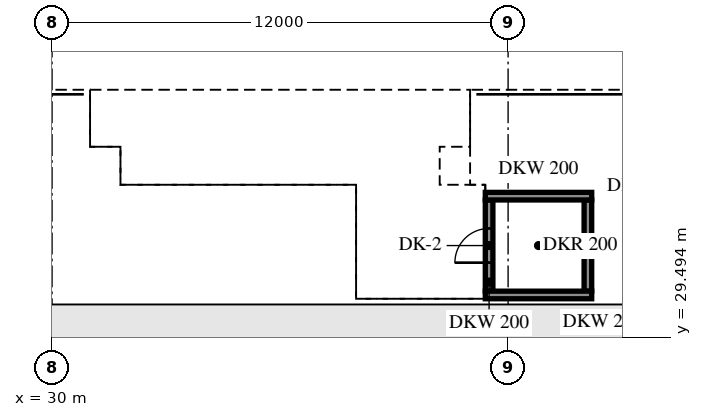
"""IFC4 building model, lengths in metres.
Left out: names, types, materials, properties, quantities, classifications, styles, units other than length and angle.
Written with IfcOpenShell. Run it as: python <this file> out.ifc"""

import sys

from ifc_helpers import new_model, si_unit, direction, frame, frame_2d, origin, place, context, subcontext, project, spatial, polyline, rectangle, outline, extrude, element, fill, save


model = new_model("IFC4")
c1 = context("Model", 3, precision=1e-05, world=origin(), true_north=direction((0.0, 1.0)))
c2 = subcontext(c1, "Body", "Model", "MODEL_VIEW")
j1 = project(units=[si_unit("LENGTHUNIT", "METRE"), si_unit("PLANEANGLEUNIT", "RADIAN")], contexts=[c1])
p1 = place(None, origin())
s1 = spatial("IfcSite", under=j1, at=p1, CompositionType="ELEMENT")
p2 = place(p1, origin())
s2 = spatial("IfcBuilding", under=s1, at=p2, CompositionType="ELEMENT")
p3 = place(p2, frame((0.0, 0.0, 7.2)))
s3 = spatial("IfcBuildingStorey", under=s2, at=p3, CompositionType="ELEMENT", Elevation=7.2)
p4 = place(p3, origin())
e1 = element("IfcWall", 1, at=p4, inside=s3, PredefinedType="NOTDEFINED", context=c2, shape_type="SweptSolid", body=[
    extrude(outline(polyline([(28.0, 33.5), (31.0, 33.5), (31.0, 34.0), (28.0, 34.0), (28.0, 33.5)])), origin(), (0.0, 0.0, 1.0), 11.34),
])
p5 = place(p3, origin())
e2 = element("IfcWall", 2, at=p5, inside=s3, PredefinedType="NOTDEFINED", context=c2, shape_type="SweptSolid", body=[
    extrude(outline(polyline([(41.0, 33.5), (44.0, 33.5), (44.0, 34.0), (41.0, 34.0), (41.0, 33.5)])), origin(), (0.0, 0.0, 1.0), 11.34),
])
p6 = place(p3, frame((0.0, 0.0, 11.34)))
e3 = element("IfcWall", 3, at=p6, inside=s3, PredefinedType="NOTDEFINED", context=c2, shape_type="SweptSolid", body=[
    extrude(outline(polyline([(28.0, 33.5), (31.018, 33.5), (31.018, 34.0), (28.0, 34.0), (28.0, 33.5)])), origin(), (0.0, 0.0, 1.0), 0.6),
])
p7 = place(p3, frame((0.0, 0.0, 11.34)))
e4 = element("IfcWall", 4, at=p7, inside=s3, PredefinedType="NOTDEFINED", context=c2, shape_type="SweptSolid", body=[
    extrude(outline(polyline([(40.982, 33.5), (44.0, 33.5), (44.0, 34.0), (40.982, 34.0), (40.982, 33.5)])), origin(), (0.0, 0.0, 1.0), 0.6),
])
p8 = place(p3, frame((0.0, 0.0, 11.94)))
e5 = element("IfcWall", 5, at=p8, inside=s3, PredefinedType="NOTDEFINED", context=c2, shape_type="SweptSolid", body=[
    extrude(outline(polyline([(28.0, 33.5), (31.072, 33.5), (31.072, 34.0), (28.0, 34.0), (28.0, 33.5)])), origin(), (0.0, 0.0, 1.0), 0.6),
])
p9 = place(p3, frame((0.0, 0.0, 11.94)))
e6 = element("IfcWall", 6, at=p9, inside=s3, PredefinedType="NOTDEFINED", context=c2, shape_type="SweptSolid", body=[
    extrude(outline(polyline([(40.928, 33.5), (44.0, 33.5), (44.0, 34.0), (40.928, 34.0), (40.928, 33.5)])), origin(), (0.0, 0.0, 1.0), 0.6),
])
p10 = place(p3, frame((0.0, 0.0, 12.54)))
e7 = element("IfcWall", 7, at=p10, inside=s3, PredefinedType="NOTDEFINED", context=c2, shape_type="SweptSolid", body=[
    extrude(outline(polyline([(28.0, 33.5), (31.163, 33.5), (31.163, 34.0), (28.0, 34.0), (28.0, 33.5)])), origin(), (0.0, 0.0, 1.0), 0.6),
])
p11 = place(p3, frame((0.0, 0.0, 12.54)))
e8 = element("IfcWall", 8, at=p11, inside=s3, PredefinedType="NOTDEFINED", context=c2, shape_type="SweptSolid", body=[
    extrude(outline(polyline([(40.837, 33.5), (44.0, 33.5), (44.0, 34.0), (40.837, 34.0), (40.837, 33.5)])), origin(), (0.0, 0.0, 1.0), 0.6),
])
p12 = place(p3, frame((0.0, 0.0, 13.14)))
e9 = element("IfcWall", 9, at=p12, inside=s3, PredefinedType="NOTDEFINED", context=c2, shape_type="SweptSolid", body=[
    extrude(outline(polyline([(28.0, 33.5), (31.292, 33.5), (31.292, 34.0), (28.0, 34.0), (28.0, 33.5)])), origin(), (0.0, 0.0, 1.0), 0.6),
])
p13 = place(p3, frame((0.0, 0.0, 13.14)))
e10 = element("IfcWall", 10, at=p13, inside=s3, PredefinedType="NOTDEFINED", context=c2, shape_type="SweptSolid", body=[
    extrude(outline(polyline([(40.708, 33.5), (44.0, 33.5), (44.0, 34.0), (40.708, 34.0), (40.708, 33.5)])), origin(), (0.0, 0.0, 1.0), 0.6),
])
p14 = place(p3, frame((0.0, 0.0, 13.74)))
e11 = element("IfcWall", 11, at=p14, inside=s3, PredefinedType="NOTDEFINED", context=c2, shape_type="SweptSolid", body=[
    extrude(outline(polyline([(28.0, 33.5), (31.461, 33.5), (31.461, 34.0), (28.0, 34.0), (28.0, 33.5)])), origin(), (0.0, 0.0, 1.0), 0.6),
])
p15 = place(p3, frame((0.0, 0.0, 13.74)))
e12 = element("IfcWall", 12, at=p15, inside=s3, PredefinedType="NOTDEFINED", context=c2, shape_type="SweptSolid", body=[
    extrude(outline(polyline([(40.539, 33.5), (44.0, 33.5), (44.0, 34.0), (40.539, 34.0), (40.539, 33.5)])), origin(), (0.0, 0.0, 1.0), 0.6),
])
p16 = place(p3, frame((0.0, 0.0, 14.34)))
e13 = element("IfcWall", 13, at=p16, inside=s3, PredefinedType="NOTDEFINED", context=c2, shape_type="SweptSolid", body=[
    extrude(outline(polyline([(28.0, 33.5), (31.67, 33.5), (31.67, 34.0), (28.0, 34.0), (28.0, 33.5)])), origin(), (0.0, 0.0, 1.0), 0.6),
])
p17 = place(p3, frame((0.0, 0.0, 14.34)))
e14 = element("IfcWall", 14, at=p17, inside=s3, PredefinedType="NOTDEFINED", context=c2, shape_type="SweptSolid", body=[
    extrude(outline(polyline([(40.33, 33.5), (44.0, 33.5), (44.0, 34.0), (40.33, 34.0), (40.33, 33.5)])), origin(), (0.0, 0.0, 1.0), 0.6),
])
p18 = place(p3, frame((0.0, 0.0, 14.94)))
e15 = element("IfcWall", 15, at=p18, inside=s3, PredefinedType="NOTDEFINED", context=c2, shape_type="SweptSolid", body=[
    extrude(outline(polyline([(28.0, 33.5), (31.925, 33.5), (31.925, 34.0), (28.0, 34.0), (28.0, 33.5)])), origin(), (0.0, 0.0, 1.0), 0.6),
])
p19 = place(p3, frame((0.0, 0.0, 14.94)))
e16 = element("IfcWall", 16, at=p19, inside=s3, PredefinedType="NOTDEFINED", context=c2, shape_type="SweptSolid", body=[
    extrude(outline(polyline([(40.075, 33.5), (44.0, 33.5), (44.0, 34.0), (40.075, 34.0), (40.075, 33.5)])), origin(), (0.0, 0.0, 1.0), 0.6),
])
p20 = place(p3, frame((0.0, 0.0, 15.54)))
e17 = element("IfcWall", 17, at=p20, inside=s3, PredefinedType="NOTDEFINED", context=c2, shape_type="SweptSolid", body=[
    extrude(outline(polyline([(28.0, 33.5), (32.227, 33.5), (32.227, 34.0), (28.0, 34.0), (28.0, 33.5)])), origin(), (0.0, 0.0, 1.0), 0.6),
])
p21 = place(p3, frame((0.0, 0.0, 15.54)))
e18 = element("IfcWall", 18, at=p21, inside=s3, PredefinedType="NOTDEFINED", context=c2, shape_type="SweptSolid", body=[
    extrude(outline(polyline([(39.773, 33.5), (44.0, 33.5), (44.0, 34.0), (39.773, 34.0), (39.773, 33.5)])), origin(), (0.0, 0.0, 1.0), 0.6),
])
p22 = place(p3, frame((0.0, 0.0, 16.14)))
e19 = element("IfcWall", 19, at=p22, inside=s3, PredefinedType="NOTDEFINED", context=c2, shape_type="SweptSolid", body=[
    extrude(outline(polyline([(28.0, 33.5), (32.583, 33.5), (32.583, 34.0), (28.0, 34.0), (28.0, 33.5)])), origin(), (0.0, 0.0, 1.0), 0.6),
])
p23 = place(p3, frame((0.0, 0.0, 16.14)))
e20 = element("IfcWall", 20, at=p23, inside=s3, PredefinedType="NOTDEFINED", context=c2, shape_type="SweptSolid", body=[
    extrude(outline(polyline([(39.417, 33.5), (44.0, 33.5), (44.0, 34.0), (39.417, 34.0), (39.417, 33.5)])), origin(), (0.0, 0.0, 1.0), 0.6),
])
p24 = place(p3, frame((0.0, 0.0, 16.74)))
e21 = element("IfcWall", 21, at=p24, inside=s3, PredefinedType="NOTDEFINED", context=c2, shape_type="SweptSolid", body=[
    extrude(outline(polyline([(28.0, 33.5), (33.0, 33.5), (33.0, 34.0), (28.0, 34.0), (28.0, 33.5)])), origin(), (0.0, 0.0, 1.0), 0.6),
])
p25 = place(p3, frame((0.0, 0.0, 16.74)))
e22 = element("IfcWall", 22, at=p25, inside=s3, PredefinedType="NOTDEFINED", context=c2, shape_type="SweptSolid", body=[
    extrude(outline(polyline([(39.0, 33.5), (44.0, 33.5), (44.0, 34.0), (39.0, 34.0), (39.0, 33.5)])), origin(), (0.0, 0.0, 1.0), 0.6),
])
p26 = place(p3, frame((0.0, 0.0, 17.34)))
e23 = element("IfcWall", 23, at=p26, inside=s3, PredefinedType="NOTDEFINED", context=c2, shape_type="SweptSolid", body=[
    extrude(outline(polyline([(28.0, 33.5), (33.487, 33.5), (33.487, 34.0), (28.0, 34.0), (28.0, 33.5)])), origin(), (0.0, 0.0, 1.0), 0.6),
])
p27 = place(p3, frame((0.0, 0.0, 17.34)))
e24 = element("IfcWall", 24, at=p27, inside=s3, PredefinedType="NOTDEFINED", context=c2, shape_type="SweptSolid", body=[
    extrude(outline(polyline([(38.513, 33.5), (44.0, 33.5), (44.0, 34.0), (38.513, 34.0), (38.513, 33.5)])), origin(), (0.0, 0.0, 1.0), 0.6),
])
p28 = place(p3, frame((0.0, 0.0, 17.94)))
e25 = element("IfcWall", 25, at=p28, inside=s3, PredefinedType="NOTDEFINED", context=c2, shape_type="SweptSolid", body=[
    extrude(outline(polyline([(28.0, 33.5), (34.06, 33.5), (34.06, 34.0), (28.0, 34.0), (28.0, 33.5)])), origin(), (0.0, 0.0, 1.0), 0.6),
])
p29 = place(p3, frame((0.0, 0.0, 17.94)))
e26 = element("IfcWall", 26, at=p29, inside=s3, PredefinedType="NOTDEFINED", context=c2, shape_type="SweptSolid", body=[
    extrude(outline(polyline([(37.94, 33.5), (44.0, 33.5), (44.0, 34.0), (37.94, 34.0), (37.94, 33.5)])), origin(), (0.0, 0.0, 1.0), 0.6),
])
p30 = place(p3, frame((0.0, 0.0, 18.54)))
e27 = element("IfcWall", 27, at=p30, inside=s3, PredefinedType="NOTDEFINED", context=c2, shape_type="SweptSolid", body=[
    extrude(outline(polyline([(28.0, 33.5), (34.742, 33.5), (34.742, 34.0), (28.0, 34.0), (28.0, 33.5)])), origin(), (0.0, 0.0, 1.0), 0.6),
])
p31 = place(p3, frame((0.0, 0.0, 18.54)))
e28 = element("IfcWall", 28, at=p31, inside=s3, PredefinedType="NOTDEFINED", context=c2, shape_type="SweptSolid", body=[
    extrude(outline(polyline([(37.258, 33.5), (44.0, 33.5), (44.0, 34.0), (37.258, 34.0), (37.258, 33.5)])), origin(), (0.0, 0.0, 1.0), 0.6),
])
p32 = place(p3, frame((0.0, 0.0, 19.14)))
e29 = element("IfcWall", 29, at=p32, inside=s3, PredefinedType="NOTDEFINED", context=c2, shape_type="SweptSolid", body=[
    extrude(outline(polyline([(28.0, 33.5), (35.574, 33.5), (35.574, 34.0), (28.0, 34.0), (28.0, 33.5)])), origin(), (0.0, 0.0, 1.0), 0.6),
])
p33 = place(p3, frame((0.0, 0.0, 19.14)))
e30 = element("IfcWall", 30, at=p33, inside=s3, PredefinedType="NOTDEFINED", context=c2, shape_type="SweptSolid", body=[
    extrude(outline(polyline([(36.426, 33.5), (44.0, 33.5), (44.0, 34.0), (36.426, 34.0), (36.426, 33.5)])), origin(), (0.0, 0.0, 1.0), 0.6),
])
p34 = place(p3, frame((0.0, 0.0, 19.74)))
e31 = element("IfcWall", 31, at=p34, inside=s3, PredefinedType="NOTDEFINED", context=c2, shape_type="SweptSolid", body=[
    extrude(outline(polyline([(28.0, 33.5), (44.0, 33.5), (44.0, 34.0), (28.0, 34.0), (28.0, 33.5)])), origin(), (0.0, 0.0, 1.0), 0.26),
])
p35 = place(p3, origin())
e32 = element("IfcWall", 32, at=p35, inside=s3, PredefinedType="NOTDEFINED", context=c2, shape_type="SweptSolid", body=[
    extrude(outline(polyline([(28.0, 34.0), (31.8, 34.0), (31.8, 34.5), (28.0, 34.5), (28.0, 34.0)])), origin(), (0.0, 0.0, 1.0), 12.725),
])
p36 = place(p3, origin())
e33 = element("IfcWall", 33, at=p36, inside=s3, PredefinedType="NOTDEFINED", context=c2, shape_type="SweptSolid", body=[
    extrude(outline(polyline([(40.2, 34.0), (44.0, 34.0), (44.0, 34.5), (40.2, 34.5), (40.2, 34.0)])), origin(), (0.0, 0.0, 1.0), 12.725),
])
p37 = place(p3, frame((0.0, 0.0, 12.725)))
e34 = element("IfcWall", 34, at=p37, inside=s3, PredefinedType="NOTDEFINED", context=c2, shape_type="SweptSolid", body=[
    extrude(outline(polyline([(28.0, 34.0), (31.821, 34.0), (31.821, 34.5), (28.0, 34.5), (28.0, 34.0)])), origin(), (0.0, 0.0, 1.0), 0.6),
])
p38 = place(p3, frame((0.0, 0.0, 12.725)))
e35 = element("IfcWall", 35, at=p38, inside=s3, PredefinedType="NOTDEFINED", context=c2, shape_type="SweptSolid", body=[
    extrude(outline(polyline([(40.179, 34.0), (44.0, 34.0), (44.0, 34.5), (40.179, 34.5), (40.179, 34.0)])), origin(), (0.0, 0.0, 1.0), 0.6),
])
p39 = place(p3, frame((0.0, 0.0, 13.325)))
e36 = element("IfcWall", 36, at=p39, inside=s3, PredefinedType="NOTDEFINED", context=c2, shape_type="SweptSolid", body=[
    extrude(outline(polyline([(28.0, 34.0), (31.886, 34.0), (31.886, 34.5), (28.0, 34.5), (28.0, 34.0)])), origin(), (0.0, 0.0, 1.0), 0.6),
])
p40 = place(p3, frame((0.0, 0.0, 13.325)))
e37 = element("IfcWall", 37, at=p40, inside=s3, PredefinedType="NOTDEFINED", context=c2, shape_type="SweptSolid", body=[
    extrude(outline(polyline([(40.114, 34.0), (44.0, 34.0), (44.0, 34.5), (40.114, 34.5), (40.114, 34.0)])), origin(), (0.0, 0.0, 1.0), 0.6),
])
p41 = place(p3, frame((0.0, 0.0, 13.926)))
e38 = element("IfcWall", 38, at=p41, inside=s3, PredefinedType="NOTDEFINED", context=c2, shape_type="SweptSolid", body=[
    extrude(outline(polyline([(28.0, 34.0), (31.995, 34.0), (31.995, 34.5), (28.0, 34.5), (28.0, 34.0)])), origin(), (0.0, 0.0, 1.0), 0.6),
])
p42 = place(p3, frame((0.0, 0.0, 13.926)))
e39 = element("IfcWall", 39, at=p42, inside=s3, PredefinedType="NOTDEFINED", context=c2, shape_type="SweptSolid", body=[
    extrude(outline(polyline([(40.005, 34.0), (44.0, 34.0), (44.0, 34.5), (40.005, 34.5), (40.005, 34.0)])), origin(), (0.0, 0.0, 1.0), 0.6),
])
p43 = place(p3, frame((0.0, 0.0, 14.525)))
e40 = element("IfcWall", 40, at=p43, inside=s3, PredefinedType="NOTDEFINED", context=c2, shape_type="SweptSolid", body=[
    extrude(outline(polyline([(28.0, 34.0), (32.15, 34.0), (32.15, 34.5), (28.0, 34.5), (28.0, 34.0)])), origin(), (0.0, 0.0, 1.0), 0.6),
])
p44 = place(p3, frame((0.0, 0.0, 14.525)))
e41 = element("IfcWall", 41, at=p44, inside=s3, PredefinedType="NOTDEFINED", context=c2, shape_type="SweptSolid", body=[
    extrude(outline(polyline([(39.85, 34.0), (44.0, 34.0), (44.0, 34.5), (39.85, 34.5), (39.85, 34.0)])), origin(), (0.0, 0.0, 1.0), 0.6),
])
p45 = place(p3, frame((0.0, 0.0, 15.125)))
e42 = element("IfcWall", 42, at=p45, inside=s3, PredefinedType="NOTDEFINED", context=c2, shape_type="SweptSolid", body=[
    extrude(outline(polyline([(28.0, 34.0), (32.354, 34.0), (32.354, 34.5), (28.0, 34.5), (28.0, 34.0)])), origin(), (0.0, 0.0, 1.0), 0.6),
])
p46 = place(p3, frame((0.0, 0.0, 15.125)))
e43 = element("IfcWall", 43, at=p46, inside=s3, PredefinedType="NOTDEFINED", context=c2, shape_type="SweptSolid", body=[
    extrude(outline(polyline([(39.646, 34.0), (44.0, 34.0), (44.0, 34.5), (39.646, 34.5), (39.646, 34.0)])), origin(), (0.0, 0.0, 1.0), 0.6),
])
p47 = place(p3, frame((0.0, 0.0, 15.725)))
e44 = element("IfcWall", 44, at=p47, inside=s3, PredefinedType="NOTDEFINED", context=c2, shape_type="SweptSolid", body=[
    extrude(outline(polyline([(28.0, 34.0), (32.611, 34.0), (32.611, 34.5), (28.0, 34.5), (28.0, 34.0)])), origin(), (0.0, 0.0, 1.0), 0.6),
])
p48 = place(p3, frame((0.0, 0.0, 15.725)))
e45 = element("IfcWall", 45, at=p48, inside=s3, PredefinedType="NOTDEFINED", context=c2, shape_type="SweptSolid", body=[
    extrude(outline(polyline([(39.389, 34.0), (44.0, 34.0), (44.0, 34.5), (39.389, 34.5), (39.389, 34.0)])), origin(), (0.0, 0.0, 1.0), 0.6),
])
p49 = place(p3, frame((0.0, 0.0, 16.325)))
e46 = element("IfcWall", 46, at=p49, inside=s3, PredefinedType="NOTDEFINED", context=c2, shape_type="SweptSolid", body=[
    extrude(outline(polyline([(28.0, 34.0), (32.925, 34.0), (32.925, 34.5), (28.0, 34.5), (28.0, 34.0)])), origin(), (0.0, 0.0, 1.0), 0.6),
])
p50 = place(p3, frame((0.0, 0.0, 16.325)))
e47 = element("IfcWall", 47, at=p50, inside=s3, PredefinedType="NOTDEFINED", context=c2, shape_type="SweptSolid", body=[
    extrude(outline(polyline([(39.075, 34.0), (44.0, 34.0), (44.0, 34.5), (39.075, 34.5), (39.075, 34.0)])), origin(), (0.0, 0.0, 1.0), 0.6),
])
p51 = place(p3, frame((0.0, 0.0, 16.926)))
e48 = element("IfcWall", 48, at=p51, inside=s3, PredefinedType="NOTDEFINED", context=c2, shape_type="SweptSolid", body=[
    extrude(outline(polyline([(28.0, 34.0), (33.307, 34.0), (33.307, 34.5), (28.0, 34.5), (28.0, 34.0)])), origin(), (0.0, 0.0, 1.0), 0.6),
])
p52 = place(p3, frame((0.0, 0.0, 16.926)))
e49 = element("IfcWall", 49, at=p52, inside=s3, PredefinedType="NOTDEFINED", context=c2, shape_type="SweptSolid", body=[
    extrude(outline(polyline([(38.693, 34.0), (44.0, 34.0), (44.0, 34.5), (38.693, 34.5), (38.693, 34.0)])), origin(), (0.0, 0.0, 1.0), 0.6),
])
p53 = place(p3, frame((0.0, 0.0, 17.525)))
e50 = element("IfcWall", 50, at=p53, inside=s3, PredefinedType="NOTDEFINED", context=c2, shape_type="SweptSolid", body=[
    extrude(outline(polyline([(28.0, 34.0), (33.766, 34.0), (33.766, 34.5), (28.0, 34.5), (28.0, 34.0)])), origin(), (0.0, 0.0, 1.0), 0.6),
])
p54 = place(p3, frame((0.0, 0.0, 17.525)))
e51 = element("IfcWall", 51, at=p54, inside=s3, PredefinedType="NOTDEFINED", context=c2, shape_type="SweptSolid", body=[
    extrude(outline(polyline([(38.234, 34.0), (44.0, 34.0), (44.0, 34.5), (38.234, 34.5), (38.234, 34.0)])), origin(), (0.0, 0.0, 1.0), 0.6),
])
p55 = place(p3, frame((0.0, 0.0, 18.125)))
e52 = element("IfcWall", 52, at=p55, inside=s3, PredefinedType="NOTDEFINED", context=c2, shape_type="SweptSolid", body=[
    extrude(outline(polyline([(28.0, 34.0), (34.321, 34.0), (34.321, 34.5), (28.0, 34.5), (28.0, 34.0)])), origin(), (0.0, 0.0, 1.0), 0.6),
])
p56 = place(p3, frame((0.0, 0.0, 18.125)))
e53 = element("IfcWall", 53, at=p56, inside=s3, PredefinedType="NOTDEFINED", context=c2, shape_type="SweptSolid", body=[
    extrude(outline(polyline([(37.679, 34.0), (44.0, 34.0), (44.0, 34.5), (37.679, 34.5), (37.679, 34.0)])), origin(), (0.0, 0.0, 1.0), 0.6),
])
p57 = place(p3, frame((0.0, 0.0, 18.725)))
e54 = element("IfcWall", 54, at=p57, inside=s3, PredefinedType="NOTDEFINED", context=c2, shape_type="SweptSolid", body=[
    extrude(outline(polyline([(28.0, 34.0), (35.004, 34.0), (35.004, 34.5), (28.0, 34.5), (28.0, 34.0)])), origin(), (0.0, 0.0, 1.0), 0.6),
])
p58 = place(p3, frame((0.0, 0.0, 18.725)))
e55 = element("IfcWall", 55, at=p58, inside=s3, PredefinedType="NOTDEFINED", context=c2, shape_type="SweptSolid", body=[
    extrude(outline(polyline([(36.996, 34.0), (44.0, 34.0), (44.0, 34.5), (36.996, 34.5), (36.996, 34.0)])), origin(), (0.0, 0.0, 1.0), 0.6),
])
p59 = place(p3, frame((0.0, 0.0, 19.325)))
e56 = element("IfcWall", 56, at=p59, inside=s3, PredefinedType="NOTDEFINED", context=c2, shape_type="SweptSolid", body=[
    extrude(outline(polyline([(28.0, 34.0), (44.0, 34.0), (44.0, 34.5), (28.0, 34.5), (28.0, 34.0)])), origin(), (0.0, 0.0, 1.0), 0.6),
])
p60 = place(p3, frame((0.0, 0.0, 19.926)))
e57 = element("IfcWall", 57, at=p60, inside=s3, PredefinedType="NOTDEFINED", context=c2, shape_type="SweptSolid", body=[
    extrude(outline(polyline([(28.0, 34.0), (44.0, 34.0), (44.0, 34.5), (28.0, 34.5), (28.0, 34.0)])), origin(), (0.0, 0.0, 1.0), 0.074),
])
for number, where, z_axis, x_axis in (
    (58, (41.4, 30.6, 0.0), (0.0, 0.0, 1.0), (1.0, 0.0, 0.0)),
    (59, (41.4, 33.2, 0.0), (0.0, 0.0, 1.0), (1.0, 0.0, 0.0)),
):
    element("IfcWall", number, at=place(p3, frame(where, z_axis=z_axis, x_axis=x_axis)), inside=s3, PredefinedType="SOLIDWALL", context=c2, shape_type="SweptSolid", body=[
        extrude(rectangle(XDim=2.8, YDim=0.2, at=frame_2d((1.4, 0.0))), origin(), (0.0, 0.0, 1.0), 2.9),
    ])
p61 = place(p3, frame((41.5, 30.7, 0.0), z_axis=(0.0, 0.0, 1.0), x_axis=(0.0, 1.0, 0.0)))
e60 = element("IfcWall", 60, at=p61, inside=s3, PredefinedType="SOLIDWALL", context=c2, shape_type="SweptSolid", body=[
    extrude(rectangle(XDim=2.4, YDim=0.2, at=frame_2d((1.2, 0.0))), origin(), (0.0, 0.0, 1.0), 2.9),
])
p62 = place(p61, frame((0.75, 0.0, 0.0)))
e61 = element("IfcOpeningElement", 61, at=p62, cuts=e60, PredefinedType="OPENING", context=c2, shape_type="SweptSolid", body=[
    extrude(rectangle(XDim=0.9, YDim=2.1, at=frame_2d((0.45, 1.05))), frame((0.0, 0.11, 0.0), z_axis=(0.0, -1.0, 0.0), x_axis=(1.0, 0.0, 0.0)), (0.0, 0.0, 1.0), 0.22),
])
p63 = place(p3, frame((44.1, 30.7, 0.0), z_axis=(0.0, 0.0, 1.0), x_axis=(0.0, 1.0, 0.0)))
e62 = element("IfcWall", 62, at=p63, inside=s3, PredefinedType="SOLIDWALL", context=c2, shape_type="SweptSolid", body=[
    extrude(rectangle(XDim=2.4, YDim=0.2, at=frame_2d((1.2, 0.0))), origin(), (0.0, 0.0, 1.0), 2.9),
])
p64 = place(p62, origin())
e63 = element("IfcDoor", 63, at=p64, inside=s3, OperationType="SINGLE_SWING_RIGHT", PredefinedType="DOOR", context=c2, shape_type="SweptSolid", body=[
    extrude(rectangle(XDim=0.9, YDim=2.1, at=frame_2d((0.45, 1.05))), frame((0.0, 0.025, 0.0), z_axis=(0.0, -1.0, 0.0), x_axis=(1.0, 0.0, 0.0)), (0.0, 0.0, 1.0), 0.05),
])
fill(e61, e63)
save(model, sys.argv[1])
